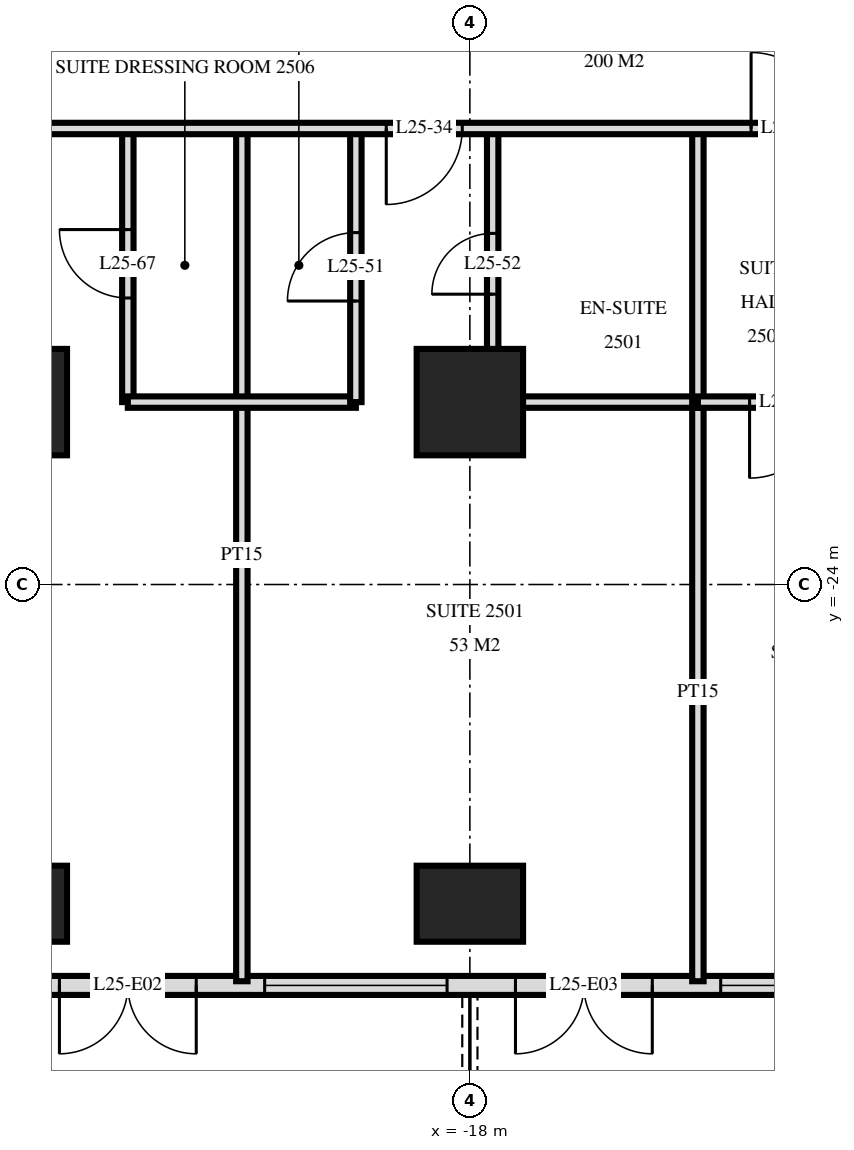
"""IFC4 building model, lengths in metres.
Left out: names, types, materials, properties, quantities, classifications, styles, units other than length and angle.
Written with IfcOpenShell. Run it as: python <this file> out.ifc"""

import sys

from ifc_helpers import new_model, si_unit, direction, frame, frame_2d, origin, origin_2d, place, context, subcontext, project, spatial, rectangle, extrude, element, fill, save


model = new_model("IFC4")
c1 = context("Model", 3, precision=1e-05, world=origin(), true_north=direction((0.0, 1.0)))
c2 = subcontext(c1, "Body", "Model", "MODEL_VIEW")
j1 = project(units=[si_unit("LENGTHUNIT", "METRE"), si_unit("PLANEANGLEUNIT", "RADIAN")], contexts=[c1])
p1 = place(None, origin())
s1 = spatial("IfcSite", under=j1, at=p1, CompositionType="ELEMENT")
p2 = place(p1, origin())
s2 = spatial("IfcBuilding", under=s1, at=p2, CompositionType="ELEMENT")
p3 = place(p2, frame((0.0, 0.0, 99.6)))
s3 = spatial("IfcBuildingStorey", under=s2, at=p3, CompositionType="ELEMENT", Elevation=99.6)
p4 = place(p3, frame((-24.0, -28.2, 0.0), z_axis=(0.0, 0.0, 1.0), x_axis=(1.0, 0.0, 0.0)))
e1 = element("IfcColumn", 1, at=p4, inside=s3, PredefinedType="COLUMN", context=c2, shape_type="SweptSolid", body=[
    extrude(rectangle(XDim=1.4, YDim=1.0, at=origin_2d()), origin(), (0.0, 0.0, 1.0), 3.6),
])
p5 = place(p3, frame((-24.0, -21.6, 0.0), z_axis=(0.0, 0.0, 1.0), x_axis=(1.0, 0.0, 0.0)))
e2 = element("IfcColumn", 2, at=p5, inside=s3, PredefinedType="COLUMN", context=c2, shape_type="SweptSolid", body=[
    extrude(rectangle(XDim=1.4, YDim=1.4, at=origin_2d()), origin(), (0.0, 0.0, 1.0), 3.6),
])
p6 = place(p3, frame((-18.0, -28.2, 0.0), z_axis=(0.0, 0.0, 1.0), x_axis=(1.0, 0.0, 0.0)))
e3 = element("IfcColumn", 3, at=p6, inside=s3, PredefinedType="COLUMN", context=c2, shape_type="SweptSolid", body=[
    extrude(rectangle(XDim=1.4, YDim=1.0, at=origin_2d()), origin(), (0.0, 0.0, 1.0), 3.6),
])
p7 = place(p3, frame((-18.0, -21.6, 0.0), z_axis=(0.0, 0.0, 1.0), x_axis=(1.0, 0.0, 0.0)))
e4 = element("IfcColumn", 4, at=p7, inside=s3, PredefinedType="COLUMN", context=c2, shape_type="SweptSolid", body=[
    extrude(rectangle(XDim=1.4, YDim=1.4, at=origin_2d()), origin(), (0.0, 0.0, 1.0), 3.6),
])
p8 = place(p3, frame((-28.775, -29.275, 0.0), z_axis=(0.0, 0.0, 1.0), x_axis=(1.0, 0.0, 0.0)))
e5 = element("IfcWall", 5, at=p8, inside=s3, PredefinedType="SOLIDWALL", context=c2, shape_type="SweptSolid", body=[
    extrude(rectangle(XDim=57.551, YDim=0.25, at=frame_2d((28.775, 0.0))), origin(), (0.0, 0.0, 1.0), 3.32),
])
p9 = place(p8, frame((0.575, 0.0, 0.0)))
e6 = element("IfcOpeningElement", 6, at=p9, cuts=e5, PredefinedType="OPENING", context=c2, shape_type="SweptSolid", body=[
    extrude(rectangle(XDim=1.8, YDim=2.4, at=frame_2d((0.9, 1.2))), frame((0.0, 0.135, 0.0), z_axis=(0.0, -1.0, 0.0), x_axis=(1.0, 0.0, 0.0)), (0.0, 0.0, 1.0), 0.27),
])
p10 = place(p8, frame((5.375, 0.0, 0.0)))
e7 = element("IfcOpeningElement", 7, at=p10, cuts=e5, PredefinedType="OPENING", context=c2, shape_type="SweptSolid", body=[
    extrude(rectangle(XDim=1.8, YDim=2.4, at=frame_2d((0.9, 1.2))), frame((0.0, 0.135, 0.0), z_axis=(0.0, -1.0, 0.0), x_axis=(1.0, 0.0, 0.0)), (0.0, 0.0, 1.0), 0.27),
])
p11 = place(p8, frame((8.075, 0.0, 0.3)))
e8 = element("IfcOpeningElement", 8, at=p11, cuts=e5, PredefinedType="OPENING", context=c2, shape_type="SweptSolid", body=[
    extrude(rectangle(XDim=2.4, YDim=2.1, at=frame_2d((1.2, 1.05))), frame((0.0, 0.135, 0.0), z_axis=(0.0, -1.0, 0.0), x_axis=(1.0, 0.0, 0.0)), (0.0, 0.0, 1.0), 0.27),
])
p12 = place(p8, frame((11.375, 0.0, 0.0)))
e9 = element("IfcOpeningElement", 9, at=p12, cuts=e5, PredefinedType="OPENING", context=c2, shape_type="SweptSolid", body=[
    extrude(rectangle(XDim=1.8, YDim=2.4, at=frame_2d((0.9, 1.2))), frame((0.0, 0.135, 0.0), z_axis=(0.0, -1.0, 0.0), x_axis=(1.0, 0.0, 0.0)), (0.0, 0.0, 1.0), 0.27),
])
p13 = place(p8, frame((14.075, 0.0, 0.3)))
e10 = element("IfcOpeningElement", 10, at=p13, cuts=e5, PredefinedType="OPENING", context=c2, shape_type="SweptSolid", body=[
    extrude(rectangle(XDim=2.4, YDim=2.1, at=frame_2d((1.2, 1.05))), frame((0.0, 0.135, 0.0), z_axis=(0.0, -1.0, 0.0), x_axis=(1.0, 0.0, 0.0)), (0.0, 0.0, 1.0), 0.27),
])
p14 = place(p8, frame((17.375, 0.0, 0.0)))
e11 = element("IfcOpeningElement", 11, at=p14, cuts=e5, PredefinedType="OPENING", context=c2, shape_type="SweptSolid", body=[
    extrude(rectangle(XDim=1.8, YDim=2.4, at=frame_2d((0.9, 1.2))), frame((0.0, 0.135, 0.0), z_axis=(0.0, -1.0, 0.0), x_axis=(1.0, 0.0, 0.0)), (0.0, 0.0, 1.0), 0.27),
])
p15 = place(p8, frame((20.075, 0.0, 0.3)))
e12 = element("IfcOpeningElement", 12, at=p15, cuts=e5, PredefinedType="OPENING", context=c2, shape_type="SweptSolid", body=[
    extrude(rectangle(XDim=2.4, YDim=2.1, at=frame_2d((1.2, 1.05))), frame((0.0, 0.135, 0.0), z_axis=(0.0, -1.0, 0.0), x_axis=(1.0, 0.0, 0.0)), (0.0, 0.0, 1.0), 0.27),
])
p16 = place(p8, frame((23.075, 0.0, 0.3)))
e13 = element("IfcOpeningElement", 13, at=p16, cuts=e5, PredefinedType="OPENING", context=c2, shape_type="SweptSolid", body=[
    extrude(rectangle(XDim=2.4, YDim=2.1, at=frame_2d((1.2, 1.05))), frame((0.0, 0.135, 0.0), z_axis=(0.0, -1.0, 0.0), x_axis=(1.0, 0.0, 0.0)), (0.0, 0.0, 1.0), 0.27),
])
p17 = place(p8, frame((26.375, 0.0, 0.0)))
e14 = element("IfcOpeningElement", 14, at=p17, cuts=e5, PredefinedType="OPENING", context=c2, shape_type="SweptSolid", body=[
    extrude(rectangle(XDim=1.8, YDim=2.4, at=frame_2d((0.9, 1.2))), frame((0.0, 0.135, 0.0), z_axis=(0.0, -1.0, 0.0), x_axis=(1.0, 0.0, 0.0)), (0.0, 0.0, 1.0), 0.27),
])
p18 = place(p8, frame((29.075, 0.0, 0.3)))
e15 = element("IfcOpeningElement", 15, at=p18, cuts=e5, PredefinedType="OPENING", context=c2, shape_type="SweptSolid", body=[
    extrude(rectangle(XDim=2.4, YDim=2.1, at=frame_2d((1.2, 1.05))), frame((0.0, 0.135, 0.0), z_axis=(0.0, -1.0, 0.0), x_axis=(1.0, 0.0, 0.0)), (0.0, 0.0, 1.0), 0.27),
])
p19 = place(p8, frame((32.375, 0.0, 0.0)))
e16 = element("IfcOpeningElement", 16, at=p19, cuts=e5, PredefinedType="OPENING", context=c2, shape_type="SweptSolid", body=[
    extrude(rectangle(XDim=1.8, YDim=2.4, at=frame_2d((0.9, 1.2))), frame((0.0, 0.135, 0.0), z_axis=(0.0, -1.0, 0.0), x_axis=(1.0, 0.0, 0.0)), (0.0, 0.0, 1.0), 0.27),
])
p20 = place(p8, frame((35.375, 0.0, 0.0)))
e17 = element("IfcOpeningElement", 17, at=p20, cuts=e5, PredefinedType="OPENING", context=c2, shape_type="SweptSolid", body=[
    extrude(rectangle(XDim=1.8, YDim=2.4, at=frame_2d((0.9, 1.2))), frame((0.0, 0.135, 0.0), z_axis=(0.0, -1.0, 0.0), x_axis=(1.0, 0.0, 0.0)), (0.0, 0.0, 1.0), 0.27),
])
p21 = place(p8, frame((38.075, 0.0, 0.3)))
e18 = element("IfcOpeningElement", 18, at=p21, cuts=e5, PredefinedType="OPENING", context=c2, shape_type="SweptSolid", body=[
    extrude(rectangle(XDim=2.4, YDim=2.1, at=frame_2d((1.2, 1.05))), frame((0.0, 0.135, 0.0), z_axis=(0.0, -1.0, 0.0), x_axis=(1.0, 0.0, 0.0)), (0.0, 0.0, 1.0), 0.27),
])
p22 = place(p8, frame((41.375, 0.0, 0.0)))
e19 = element("IfcOpeningElement", 19, at=p22, cuts=e5, PredefinedType="OPENING", context=c2, shape_type="SweptSolid", body=[
    extrude(rectangle(XDim=1.8, YDim=2.4, at=frame_2d((0.9, 1.2))), frame((0.0, 0.135, 0.0), z_axis=(0.0, -1.0, 0.0), x_axis=(1.0, 0.0, 0.0)), (0.0, 0.0, 1.0), 0.27),
])
p23 = place(p8, frame((44.075, 0.0, 0.3)))
e20 = element("IfcOpeningElement", 20, at=p23, cuts=e5, PredefinedType="OPENING", context=c2, shape_type="SweptSolid", body=[
    extrude(rectangle(XDim=2.4, YDim=2.1, at=frame_2d((1.2, 1.05))), frame((0.0, 0.135, 0.0), z_axis=(0.0, -1.0, 0.0), x_axis=(1.0, 0.0, 0.0)), (0.0, 0.0, 1.0), 0.27),
])
p24 = place(p8, frame((47.075, 0.0, 0.3)))
e21 = element("IfcOpeningElement", 21, at=p24, cuts=e5, PredefinedType="OPENING", context=c2, shape_type="SweptSolid", body=[
    extrude(rectangle(XDim=2.4, YDim=2.1, at=frame_2d((1.2, 1.05))), frame((0.0, 0.135, 0.0), z_axis=(0.0, -1.0, 0.0), x_axis=(1.0, 0.0, 0.0)), (0.0, 0.0, 1.0), 0.27),
])
p25 = place(p8, frame((50.375, 0.0, 0.0)))
e22 = element("IfcOpeningElement", 22, at=p25, cuts=e5, PredefinedType="OPENING", context=c2, shape_type="SweptSolid", body=[
    extrude(rectangle(XDim=1.8, YDim=2.4, at=frame_2d((0.9, 1.2))), frame((0.0, 0.135, 0.0), z_axis=(0.0, -1.0, 0.0), x_axis=(1.0, 0.0, 0.0)), (0.0, 0.0, 1.0), 0.27),
])
p26 = place(p8, frame((53.375, 0.0, 0.0)))
e23 = element("IfcOpeningElement", 23, at=p26, cuts=e5, PredefinedType="OPENING", context=c2, shape_type="SweptSolid", body=[
    extrude(rectangle(XDim=1.8, YDim=2.4, at=frame_2d((0.9, 1.2))), frame((0.0, 0.135, 0.0), z_axis=(0.0, -1.0, 0.0), x_axis=(1.0, 0.0, 0.0)), (0.0, 0.0, 1.0), 0.27),
])
p27 = place(p3, frame((-15.0, -21.6, 0.0), z_axis=(0.0, 0.0, 1.0), x_axis=(0.0, 1.0, 0.0)))
e24 = element("IfcWall", 24, at=p27, inside=s3, PredefinedType="PARTITIONING", context=c2, shape_type="SweptSolid", body=[
    extrude(rectangle(XDim=3.6, YDim=0.15, at=frame_2d((1.8, 0.0))), origin(), (0.0, 0.0, 1.0), 3.32),
])
p28 = place(p3, frame((-15.0, -29.22, 0.0), z_axis=(0.0, 0.0, 1.0), x_axis=(0.0, 1.0, 0.0)))
e25 = element("IfcWall", 25, at=p28, inside=s3, PredefinedType="PARTITIONING", context=c2, shape_type="SweptSolid", body=[
    extrude(rectangle(XDim=7.62, YDim=0.15, at=frame_2d((3.81, 0.0))), origin(), (0.0, 0.0, 1.0), 3.32),
])
p29 = place(p3, frame((-17.7, -21.6, 0.0), z_axis=(0.0, 0.0, 1.0), x_axis=(0.0, 1.0, 0.0)))
e26 = element("IfcWall", 26, at=p29, inside=s3, PredefinedType="PARTITIONING", context=c2, shape_type="SweptSolid", body=[
    extrude(rectangle(XDim=3.6, YDim=0.15, at=frame_2d((1.8, 0.0))), origin(), (0.0, 0.0, 1.0), 3.32),
])
p30 = place(p29, frame((1.42, 0.0, 0.0)))
e27 = element("IfcOpeningElement", 27, at=p30, cuts=e26, PredefinedType="OPENING", context=c2, shape_type="SweptSolid", body=[
    extrude(rectangle(XDim=0.8, YDim=2.1, at=frame_2d((0.4, 1.05))), frame((0.0, 0.085, 0.0), z_axis=(0.0, -1.0, 0.0), x_axis=(1.0, 0.0, 0.0)), (0.0, 0.0, 1.0), 0.17),
])
p31 = place(p3, frame((-19.5, -21.6, 0.0), z_axis=(0.0, 0.0, 1.0), x_axis=(0.0, 1.0, 0.0)))
e28 = element("IfcWall", 28, at=p31, inside=s3, PredefinedType="PARTITIONING", context=c2, shape_type="SweptSolid", body=[
    extrude(rectangle(XDim=3.6, YDim=0.15, at=frame_2d((1.8, 0.0))), origin(), (0.0, 0.0, 1.0), 3.32),
])
p32 = place(p31, frame((1.33, 0.0, 0.0)))
e29 = element("IfcOpeningElement", 29, at=p32, cuts=e28, PredefinedType="OPENING", context=c2, shape_type="SweptSolid", body=[
    extrude(rectangle(XDim=0.9, YDim=2.1, at=frame_2d((0.45, 1.05))), frame((0.0, 0.085, 0.0), z_axis=(0.0, -1.0, 0.0), x_axis=(1.0, 0.0, 0.0)), (0.0, 0.0, 1.0), 0.17),
])
p33 = place(p3, frame((-21.0, -29.22, 0.0), z_axis=(0.0, 0.0, 1.0), x_axis=(0.0, 1.0, 0.0)))
e30 = element("IfcWall", 30, at=p33, inside=s3, PredefinedType="PARTITIONING", context=c2, shape_type="SweptSolid", body=[
    extrude(rectangle(XDim=11.22, YDim=0.15, at=frame_2d((5.61, 0.0))), origin(), (0.0, 0.0, 1.0), 3.32),
])
p34 = place(p3, frame((-22.5, -21.6, 0.0), z_axis=(0.0, 0.0, 1.0), x_axis=(0.0, 1.0, 0.0)))
e31 = element("IfcWall", 31, at=p34, inside=s3, PredefinedType="PARTITIONING", context=c2, shape_type="SweptSolid", body=[
    extrude(rectangle(XDim=3.6, YDim=0.15, at=frame_2d((1.8, 0.0))), origin(), (0.0, 0.0, 1.0), 3.32),
])
p35 = place(p34, frame((1.37, 0.0, 0.0)))
e32 = element("IfcOpeningElement", 32, at=p35, cuts=e31, PredefinedType="OPENING", context=c2, shape_type="SweptSolid", body=[
    extrude(rectangle(XDim=0.9, YDim=2.1, at=frame_2d((0.45, 1.05))), frame((0.0, 0.085, 0.0), z_axis=(0.0, -1.0, 0.0), x_axis=(1.0, 0.0, 0.0)), (0.0, 0.0, 1.0), 0.17),
])
p36 = place(p3, frame((-15.0, -21.6, 0.0), z_axis=(0.0, 0.0, 1.0), x_axis=(1.0, 0.0, 0.0)))
e33 = element("IfcWall", 33, at=p36, inside=s3, PredefinedType="PARTITIONING", context=c2, shape_type="SweptSolid", body=[
    extrude(rectangle(XDim=2.4, YDim=0.15, at=frame_2d((1.2, 0.0))), origin(), (0.0, 0.0, 1.0), 3.32),
])
p37 = place(p36, frame((0.68, 0.0, 0.0)))
e34 = element("IfcOpeningElement", 34, at=p37, cuts=e33, PredefinedType="OPENING", context=c2, shape_type="SweptSolid", body=[
    extrude(rectangle(XDim=1.0, YDim=2.1, at=frame_2d((0.5, 1.05))), frame((0.0, 0.085, 0.0), z_axis=(0.0, -1.0, 0.0), x_axis=(1.0, 0.0, 0.0)), (0.0, 0.0, 1.0), 0.17),
])
p38 = place(p3, frame((-22.5, -21.6, 0.0), z_axis=(0.0, 0.0, 1.0), x_axis=(1.0, 0.0, 0.0)))
e35 = element("IfcWall", 35, at=p38, inside=s3, PredefinedType="PARTITIONING", context=c2, shape_type="SweptSolid", body=[
    extrude(rectangle(XDim=3.0, YDim=0.15, at=frame_2d((1.5, 0.0))), origin(), (0.0, 0.0, 1.0), 3.32),
])
p39 = place(p3, frame((-17.7, -21.6, 0.0), z_axis=(0.0, 0.0, 1.0), x_axis=(1.0, 0.0, 0.0)))
e36 = element("IfcWall", 36, at=p39, inside=s3, PredefinedType="PARTITIONING", context=c2, shape_type="SweptSolid", body=[
    extrude(rectangle(XDim=2.7, YDim=0.15, at=frame_2d((1.35, 0.0))), origin(), (0.0, 0.0, 1.0), 3.32),
])
p40 = place(p3, frame((-33.12, -18.0, 0.0), z_axis=(0.0, 0.0, 1.0), x_axis=(1.0, 0.0, 0.0)))
e37 = element("IfcWall", 37, at=p40, inside=s3, PredefinedType="PARTITIONING", context=c2, shape_type="SweptSolid", body=[
    extrude(rectangle(XDim=66.24, YDim=0.15, at=frame_2d((33.12, 0.0))), origin(), (0.0, 0.0, 1.0), 3.32),
])
p41 = place(p40, frame((14.02, 0.0, 0.0)))
e38 = element("IfcOpeningElement", 38, at=p41, cuts=e37, PredefinedType="OPENING", context=c2, shape_type="SweptSolid", body=[
    extrude(rectangle(XDim=1.0, YDim=2.1, at=frame_2d((0.5, 1.05))), frame((0.0, 0.085, 0.0), z_axis=(0.0, -1.0, 0.0), x_axis=(1.0, 0.0, 0.0)), (0.0, 0.0, 1.0), 0.17),
])
p42 = place(p40, frame((18.82, 0.0, 0.0)))
e39 = element("IfcOpeningElement", 39, at=p42, cuts=e37, PredefinedType="OPENING", context=c2, shape_type="SweptSolid", body=[
    extrude(rectangle(XDim=1.0, YDim=2.1, at=frame_2d((0.5, 1.05))), frame((0.0, 0.085, 0.0), z_axis=(0.0, -1.0, 0.0), x_axis=(1.0, 0.0, 0.0)), (0.0, 0.0, 1.0), 0.17),
])
p43 = place(p40, frame((30.27, 0.0, 0.0)))
e40 = element("IfcOpeningElement", 40, at=p43, cuts=e37, PredefinedType="OPENING", context=c2, shape_type="SweptSolid", body=[
    extrude(rectangle(XDim=1.0, YDim=2.1, at=frame_2d((0.5, 1.05))), frame((0.0, 0.085, 0.0), z_axis=(0.0, -1.0, 0.0), x_axis=(1.0, 0.0, 0.0)), (0.0, 0.0, 1.0), 0.17),
])
p44 = place(p40, frame((33.82, 0.0, 0.0)))
e41 = element("IfcOpeningElement", 41, at=p44, cuts=e37, PredefinedType="OPENING", context=c2, shape_type="SweptSolid", body=[
    extrude(rectangle(XDim=1.0, YDim=2.1, at=frame_2d((0.5, 1.05))), frame((0.0, 0.085, 0.0), z_axis=(0.0, -1.0, 0.0), x_axis=(1.0, 0.0, 0.0)), (0.0, 0.0, 1.0), 0.17),
])
p45 = place(p40, frame((46.27, 0.0, 0.0)))
e42 = element("IfcOpeningElement", 42, at=p45, cuts=e37, PredefinedType="OPENING", context=c2, shape_type="SweptSolid", body=[
    extrude(rectangle(XDim=1.0, YDim=2.1, at=frame_2d((0.5, 1.05))), frame((0.0, 0.085, 0.0), z_axis=(0.0, -1.0, 0.0), x_axis=(1.0, 0.0, 0.0)), (0.0, 0.0, 1.0), 0.17),
])
p46 = place(p40, frame((6.07, 0.0, 0.0)))
e43 = element("IfcOpeningElement", 43, at=p46, cuts=e37, PredefinedType="OPENING", context=c2, shape_type="SweptSolid", body=[
    extrude(rectangle(XDim=1.0, YDim=2.1, at=frame_2d((0.5, 1.05))), frame((0.0, 0.085, 0.0), z_axis=(0.0, -1.0, 0.0), x_axis=(1.0, 0.0, 0.0)), (0.0, 0.0, 1.0), 0.17),
])
p47 = place(p40, frame((60.37, 0.0, 0.0)))
e44 = element("IfcOpeningElement", 44, at=p47, cuts=e37, PredefinedType="OPENING", context=c2, shape_type="SweptSolid", body=[
    extrude(rectangle(XDim=1.0, YDim=2.1, at=frame_2d((0.5, 1.05))), frame((0.0, 0.085, 0.0), z_axis=(0.0, -1.0, 0.0), x_axis=(1.0, 0.0, 0.0)), (0.0, 0.0, 1.0), 0.17),
])
p48 = place(p10, frame((0.9, 0.0, 0.0), z_axis=(0.0, 0.0, 1.0), x_axis=(-1.0, 0.0, 0.0)))
e45 = element("IfcDoor", 45, at=p48, inside=s3, OperationType="DOUBLE_DOOR_SINGLE_SWING", PredefinedType="DOOR", context=c2, shape_type="SweptSolid", body=[
    extrude(rectangle(XDim=1.8, YDim=2.4, at=frame_2d((0.0, 1.2))), frame((0.0, -0.025, 0.0), z_axis=(0.0, 1.0, 0.0), x_axis=(-1.0, 0.0, 0.0)), (0.0, 0.0, 1.0), 0.05),
])
fill(e7, e45)
p49 = place(p11, origin())
e46 = element("IfcWindow", 46, at=p49, inside=s3, PartitioningType="SINGLE_PANEL", PredefinedType="WINDOW", context=c2, shape_type="SweptSolid", body=[
    extrude(rectangle(XDim=2.4, YDim=2.1, at=frame_2d((1.2, 1.05))), frame((0.0, 0.03, 0.0), z_axis=(0.0, -1.0, 0.0), x_axis=(1.0, 0.0, 0.0)), (0.0, 0.0, 1.0), 0.06),
])
fill(e8, e46)
p50 = place(p12, frame((0.9, 0.0, 0.0), z_axis=(0.0, 0.0, 1.0), x_axis=(-1.0, 0.0, 0.0)))
e47 = element("IfcDoor", 47, at=p50, inside=s3, OperationType="DOUBLE_DOOR_SINGLE_SWING", PredefinedType="DOOR", context=c2, shape_type="SweptSolid", body=[
    extrude(rectangle(XDim=1.8, YDim=2.4, at=frame_2d((0.0, 1.2))), frame((0.0, -0.025, 0.0), z_axis=(0.0, 1.0, 0.0), x_axis=(-1.0, 0.0, 0.0)), (0.0, 0.0, 1.0), 0.05),
])
fill(e9, e47)
p51 = place(p13, origin())
e48 = element("IfcWindow", 48, at=p51, inside=s3, PartitioningType="SINGLE_PANEL", PredefinedType="WINDOW", context=c2, shape_type="SweptSolid", body=[
    extrude(rectangle(XDim=2.4, YDim=2.1, at=frame_2d((1.2, 1.05))), frame((0.0, 0.03, 0.0), z_axis=(0.0, -1.0, 0.0), x_axis=(1.0, 0.0, 0.0)), (0.0, 0.0, 1.0), 0.06),
])
fill(e10, e48)
p52 = place(p41, frame((0.5, 0.0, 0.0), z_axis=(0.0, 0.0, 1.0), x_axis=(-1.0, 0.0, 0.0)))
e49 = element("IfcDoor", 49, at=p52, inside=s3, OperationType="SINGLE_SWING_LEFT", PredefinedType="DOOR", context=c2, shape_type="SweptSolid", body=[
    extrude(rectangle(XDim=1.0, YDim=2.1, at=frame_2d((0.0, 1.05))), frame((0.0, -0.025, 0.0), z_axis=(0.0, 1.0, 0.0), x_axis=(-1.0, 0.0, 0.0)), (0.0, 0.0, 1.0), 0.05),
])
fill(e38, e49)
p53 = place(p42, origin())
e50 = element("IfcDoor", 50, at=p53, inside=s3, OperationType="SINGLE_SWING_RIGHT", PredefinedType="DOOR", context=c2, shape_type="SweptSolid", body=[
    extrude(rectangle(XDim=1.0, YDim=2.1, at=frame_2d((0.5, 1.05))), frame((0.0, 0.025, 0.0), z_axis=(0.0, -1.0, 0.0), x_axis=(1.0, 0.0, 0.0)), (0.0, 0.0, 1.0), 0.05),
])
fill(e39, e50)
p54 = place(p32, origin())
e51 = element("IfcDoor", 51, at=p54, inside=s3, OperationType="SINGLE_SWING_RIGHT", PredefinedType="DOOR", context=c2, shape_type="SweptSolid", body=[
    extrude(rectangle(XDim=0.9, YDim=2.1, at=frame_2d((0.45, 1.05))), frame((0.0, 0.025, 0.0), z_axis=(0.0, -1.0, 0.0), x_axis=(1.0, 0.0, 0.0)), (0.0, 0.0, 1.0), 0.05),
])
fill(e29, e51)
p55 = place(p30, origin())
e52 = element("IfcDoor", 52, at=p55, inside=s3, OperationType="SINGLE_SWING_RIGHT", PredefinedType="DOOR", context=c2, shape_type="SweptSolid", body=[
    extrude(rectangle(XDim=0.8, YDim=2.1, at=frame_2d((0.4, 1.05))), frame((0.0, 0.025, 0.0), z_axis=(0.0, -1.0, 0.0), x_axis=(1.0, 0.0, 0.0)), (0.0, 0.0, 1.0), 0.05),
])
fill(e27, e52)
p56 = place(p37, frame((0.5, 0.0, 0.0), z_axis=(0.0, 0.0, 1.0), x_axis=(-1.0, 0.0, 0.0)))
e53 = element("IfcDoor", 53, at=p56, inside=s3, OperationType="SINGLE_SWING_LEFT", PredefinedType="DOOR", context=c2, shape_type="SweptSolid", body=[
    extrude(rectangle(XDim=1.0, YDim=2.1, at=frame_2d((0.0, 1.05))), frame((0.0, -0.025, 0.0), z_axis=(0.0, 1.0, 0.0), x_axis=(-1.0, 0.0, 0.0)), (0.0, 0.0, 1.0), 0.05),
])
fill(e34, e53)
p57 = place(p35, origin())
e54 = element("IfcDoor", 54, at=p57, inside=s3, OperationType="SINGLE_SWING_LEFT", PredefinedType="DOOR", context=c2, shape_type="SweptSolid", body=[
    extrude(rectangle(XDim=0.9, YDim=2.1, at=frame_2d((0.45, 1.05))), frame((0.0, 0.025, 0.0), z_axis=(0.0, -1.0, 0.0), x_axis=(1.0, 0.0, 0.0)), (0.0, 0.0, 1.0), 0.05),
])
fill(e32, e54)
save(model, sys.argv[1])
